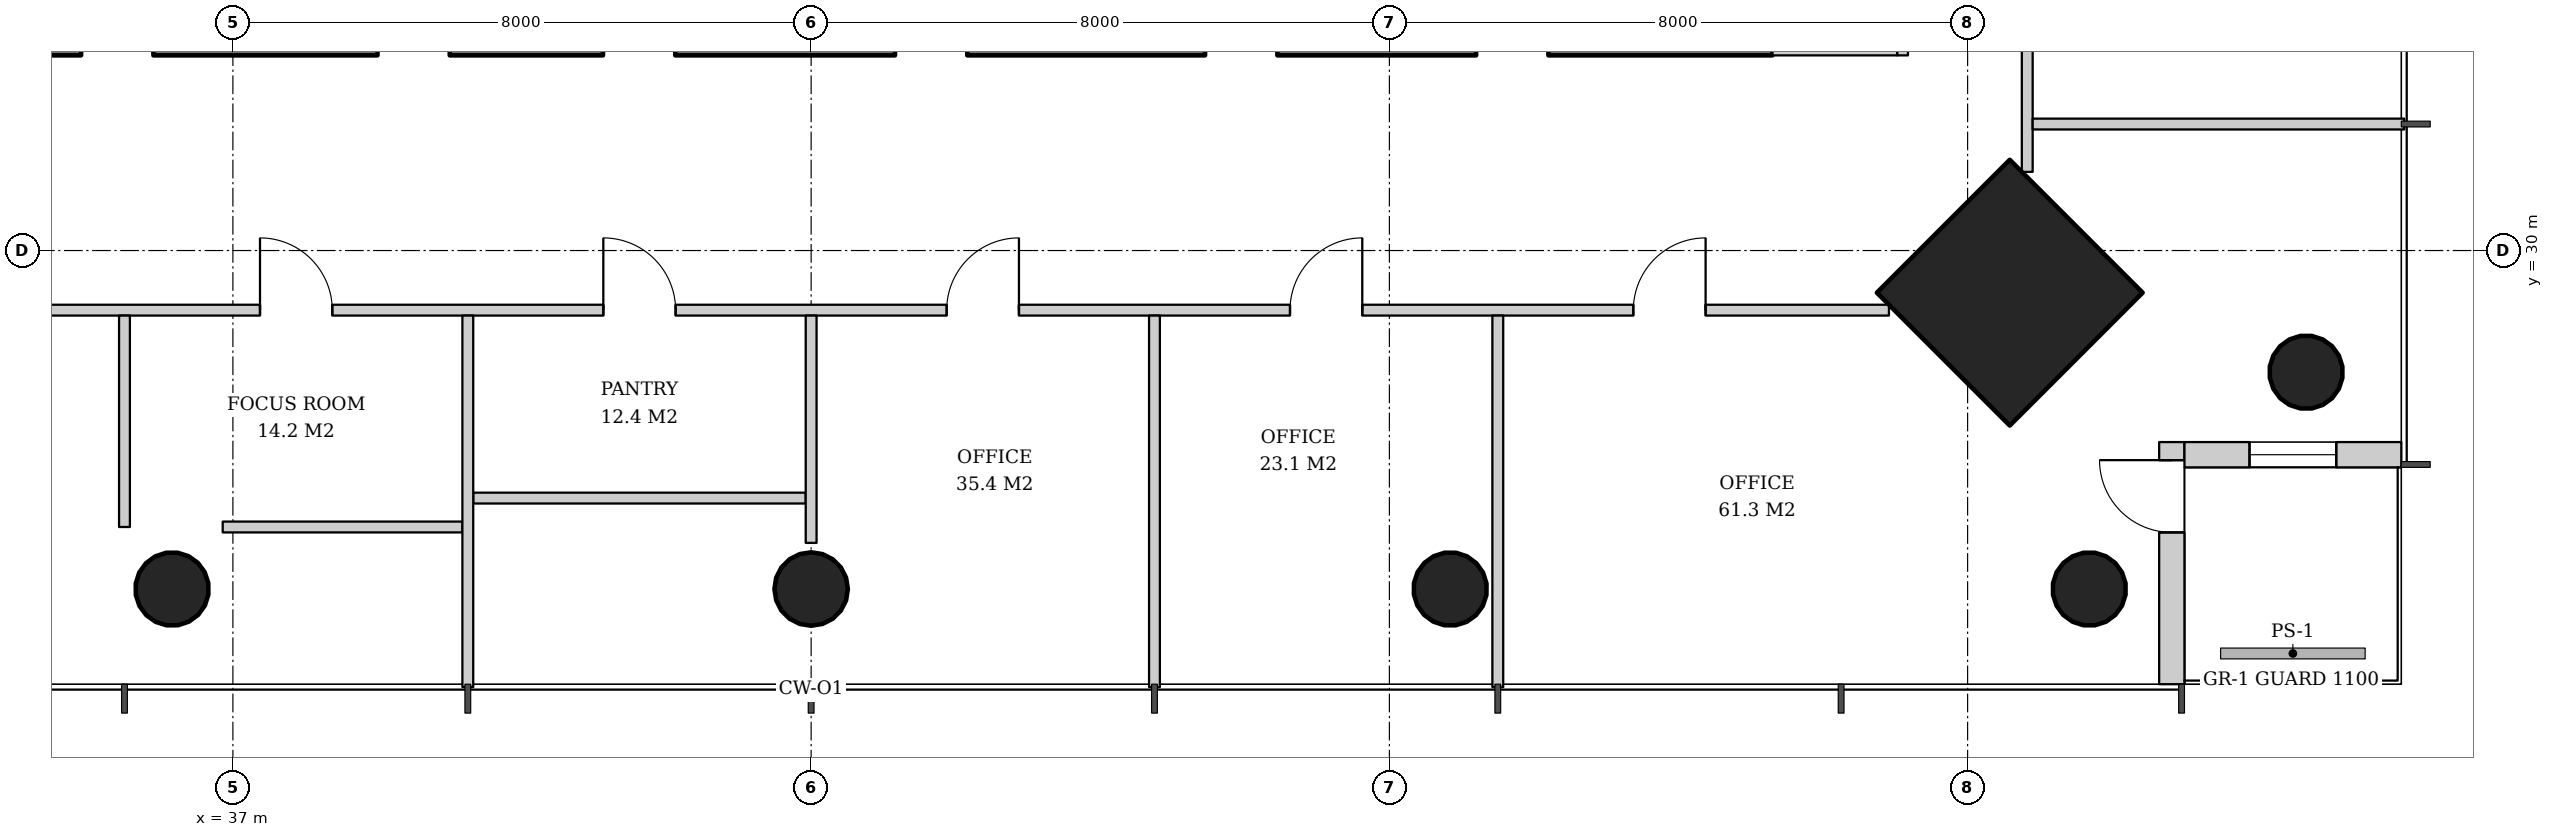
"""IFC4 building model, lengths in metres.
Left out: names, types, materials, properties, quantities, classifications, styles, units other than length and angle.
Written with IfcOpenShell. Run it as: python <this file> out.ifc"""

import sys

from ifc_helpers import new_model, si_unit, direction, frame, frame_2d, origin, origin_2d, place, context, subcontext, project, spatial, rectangle, hollow_circle, extrude, element, fill, save


model = new_model("IFC4")
c1 = context("Model", 3, precision=1e-05, world=origin(), true_north=direction((0.0, 1.0)))
c2 = subcontext(c1, "Body", "Model", "MODEL_VIEW")
j1 = project(units=[si_unit("LENGTHUNIT", "METRE"), si_unit("PLANEANGLEUNIT", "RADIAN")], contexts=[c1])
p1 = place(None, origin())
s1 = spatial("IfcSite", under=j1, at=p1, CompositionType="ELEMENT")
p2 = place(p1, origin())
s2 = spatial("IfcBuilding", under=s1, at=p2, CompositionType="ELEMENT")
p3 = place(p2, frame((0.0, 0.0, 123.6)))
s3 = spatial("IfcBuildingStorey", under=s2, at=p3, CompositionType="ELEMENT", Elevation=123.6)
p4 = place(p3, frame((65.721, 28.279, 0.0), z_axis=(-0.031900153262, 0.031900153262, 0.998981861919), x_axis=(-0.707106781187, -0.707106781187, 0.0)))
e1 = element("IfcColumn", 1, at=p4, inside=s3, PredefinedType="COLUMN", context=c2, shape_type="SweptSolid", body=[
    extrude(hollow_circle(Radius=0.508, WallThickness=0.04, at=origin_2d()), origin(), (0.0, 0.0, 1.0), 3.804),
])
p5 = place(p3, frame((61.621, 29.379, 0.0), z_axis=(-0.031900153262, 0.031900153262, 0.998981861919), x_axis=(-0.707106781187, -0.707106781187, 0.0)))
e2 = element("IfcColumn", 2, at=p5, inside=s3, PredefinedType="COLUMN", context=c2, shape_type="SweptSolid", body=[
    extrude(rectangle(XDim=2.6, YDim=2.6, at=origin_2d()), origin(), (0.0, 0.0, 1.0), 3.804),
])
p6 = place(p3, frame((62.721, 25.279, 0.0), z_axis=(-0.031900153262, 0.031900153262, 0.998981861919), x_axis=(-0.707106781187, -0.707106781187, 0.0)))
e3 = element("IfcColumn", 3, at=p6, inside=s3, PredefinedType="COLUMN", context=c2, shape_type="SweptSolid", body=[
    extrude(hollow_circle(Radius=0.508, WallThickness=0.04, at=origin_2d()), origin(), (0.0, 0.0, 1.0), 3.804),
])
p7 = place(p3, frame((36.139, 25.279, 0.0), z_axis=(0.015924069971, 0.031912349901, 0.999363810591), x_axis=(-0.894786976326, 0.446493300058, 0.0)))
e4 = element("IfcColumn", 4, at=p7, inside=s3, PredefinedType="COLUMN", context=c2, shape_type="SweptSolid", body=[
    extrude(hollow_circle(Radius=0.508, WallThickness=0.04, at=origin_2d()), origin(), (0.0, 0.0, 1.0), 3.802),
])
p8 = place(p3, frame((45.0, 25.279, 0.0), z_axis=(0.0, 0.031916396774, 0.999490542035), x_axis=(-1.0, 0.0, 0.0)))
e5 = element("IfcColumn", 5, at=p8, inside=s3, PredefinedType="COLUMN", context=c2, shape_type="SweptSolid", body=[
    extrude(hollow_circle(Radius=0.508, WallThickness=0.04, at=origin_2d()), origin(), (0.0, 0.0, 1.0), 3.802),
])
p9 = place(p3, frame((53.861, 25.279, 0.0), z_axis=(-0.015924069971, 0.031912349901, 0.999363810591), x_axis=(-0.894786976326, -0.446493300058, 0.0)))
e6 = element("IfcColumn", 6, at=p9, inside=s3, PredefinedType="COLUMN", context=c2, shape_type="SweptSolid", body=[
    extrude(hollow_circle(Radius=0.508, WallThickness=0.04, at=origin_2d()), origin(), (0.0, 0.0, 1.0), 3.802),
])
p10 = place(p3, frame((31.7, 33.05, 0.0), z_axis=(0.0, 0.0, 1.0), x_axis=(1.0, 0.0, 0.0)))
e7 = element("IfcWall", 7, at=p10, inside=s3, PredefinedType="SHEAR", context=c2, shape_type="SweptSolid", body=[
    extrude(rectangle(XDim=26.6, YDim=0.7, at=frame_2d((13.3, 0.0))), origin(), (0.0, 0.0, 1.0), 3.8),
])
p11 = place(p10, frame((7.3, 0.0, 0.0)))
e8 = element("IfcOpeningElement", 8, at=p11, cuts=e7, PredefinedType="OPENING", context=c2, shape_type="SweptSolid", body=[
    extrude(rectangle(XDim=1.0, YDim=2.1, at=frame_2d((0.5, 1.05))), frame((0.0, 0.36, 0.0), z_axis=(0.0, -1.0, 0.0), x_axis=(1.0, 0.0, 0.0)), (0.0, 0.0, 1.0), 0.72),
])
p12 = place(p10, frame((18.75, 0.0, 0.0)))
e9 = element("IfcOpeningElement", 9, at=p12, cuts=e7, PredefinedType="OPENING", context=c2, shape_type="SweptSolid", body=[
    extrude(rectangle(XDim=1.0, YDim=2.1, at=frame_2d((0.5, 1.05))), frame((0.0, 0.36, 0.0), z_axis=(0.0, -1.0, 0.0), x_axis=(1.0, 0.0, 0.0)), (0.0, 0.0, 1.0), 0.72),
])
p13 = place(p10, frame((3.2, 0.0, 0.0)))
e10 = element("IfcOpeningElement", 10, at=p13, cuts=e7, PredefinedType="OPENING", context=c2, shape_type="SweptSolid", body=[
    extrude(rectangle(XDim=1.0, YDim=2.1, at=frame_2d((0.5, 1.05))), frame((0.0, 0.36, 0.0), z_axis=(0.0, -1.0, 0.0), x_axis=(1.0, 0.0, 0.0)), (0.0, 0.0, 1.0), 0.72),
])
p14 = place(p10, frame((10.42, 0.0, 0.0)))
e11 = element("IfcOpeningElement", 11, at=p14, cuts=e7, PredefinedType="OPENING", context=c2, shape_type="SweptSolid", body=[
    extrude(rectangle(XDim=1.0, YDim=2.1, at=frame_2d((0.5, 1.05))), frame((0.0, 0.36, 0.0), z_axis=(0.0, -1.0, 0.0), x_axis=(1.0, 0.0, 0.0)), (0.0, 0.0, 1.0), 0.72),
])
p15 = place(p10, frame((14.46, 0.0, 0.0)))
e12 = element("IfcOpeningElement", 12, at=p15, cuts=e7, PredefinedType="OPENING", context=c2, shape_type="SweptSolid", body=[
    extrude(rectangle(XDim=1.0, YDim=2.1, at=frame_2d((0.5, 1.05))), frame((0.0, 0.36, 0.0), z_axis=(0.0, -1.0, 0.0), x_axis=(1.0, 0.0, 0.0)), (0.0, 0.0, 1.0), 0.72),
])
p16 = place(p10, frame((22.5, 0.0, 0.0)))
e13 = element("IfcOpeningElement", 13, at=p16, cuts=e7, PredefinedType="OPENING", context=c2, shape_type="SweptSolid", body=[
    extrude(rectangle(XDim=1.0, YDim=2.1, at=frame_2d((0.5, 1.05))), frame((0.0, 0.36, 0.0), z_axis=(0.0, -1.0, 0.0), x_axis=(1.0, 0.0, 0.0)), (0.0, 0.0, 1.0), 0.72),
])
p17 = place(p3, frame((63.825, 24.0, 0.0), z_axis=(0.0, 0.0, 1.0), x_axis=(0.0, 1.0, 0.0)))
e14 = element("IfcWall", 14, at=p17, inside=s3, PredefinedType="SOLIDWALL", context=c2, shape_type="SweptSolid", body=[
    extrude(rectangle(XDim=3.35, YDim=0.35, at=frame_2d((1.675, 0.0))), origin(), (0.0, 0.0, 1.0), 3.62),
])
p18 = place(p17, frame((2.1, 0.0, 0.0)))
e15 = element("IfcOpeningElement", 15, at=p18, cuts=e14, PredefinedType="OPENING", context=c2, shape_type="SweptSolid", body=[
    extrude(rectangle(XDim=1.0, YDim=2.4, at=frame_2d((0.5, 1.2))), frame((0.0, 0.185, 0.0), z_axis=(0.0, -1.0, 0.0), x_axis=(1.0, 0.0, 0.0)), (0.0, 0.0, 1.0), 0.37),
])
p19 = place(p3, frame((64.0, 27.175, 0.0), z_axis=(0.0, 0.0, 1.0), x_axis=(1.0, 0.0, 0.0)))
e16 = element("IfcWall", 16, at=p19, inside=s3, PredefinedType="SOLIDWALL", context=c2, shape_type="SweptSolid", body=[
    extrude(rectangle(XDim=3.0, YDim=0.35, at=frame_2d((1.5, 0.0))), origin(), (0.0, 0.0, 1.0), 3.62),
])
p20 = place(p19, frame((0.9, 0.0, 0.6)))
e17 = element("IfcOpeningElement", 17, at=p20, cuts=e16, PredefinedType="OPENING", context=c2, shape_type="SweptSolid", body=[
    extrude(rectangle(XDim=1.2, YDim=2.55, at=frame_2d((0.6, 1.275))), frame((0.0, 0.185, 0.0), z_axis=(0.0, -1.0, 0.0), x_axis=(1.0, 0.0, 0.0)), (0.0, 0.0, 1.0), 0.37),
])
p21 = place(p3, frame((60.1, 32.7, 0.0), z_axis=(0.0, 0.0, 1.0), x_axis=(0.0, 1.0, 0.0)))
e18 = element("IfcWall", 18, at=p21, inside=s3, PredefinedType="PARTITIONING", context=c2, shape_type="SweptSolid", body=[
    extrude(rectangle(XDim=11.275, YDim=0.15, at=frame_2d((5.638, 0.0))), origin(), (0.0, 0.0, 1.0), 2.72),
])
p22 = place(p21, frame((5.137, 0.0, 0.0)))
e19 = element("IfcOpeningElement", 19, at=p22, cuts=e18, PredefinedType="OPENING", context=c2, shape_type="SweptSolid", body=[
    extrude(rectangle(XDim=1.0, YDim=2.1, at=frame_2d((0.5, 1.05))), frame((0.0, 0.085, 0.0), z_axis=(0.0, -1.0, 0.0), x_axis=(1.0, 0.0, 0.0)), (0.0, 0.0, 1.0), 0.17),
])
p23 = place(p3, frame((58.3, 32.775, 0.0), z_axis=(0.0, 0.0, 1.0), x_axis=(1.0, 0.0, 0.0)))
e20 = element("IfcWall", 20, at=p23, inside=s3, PredefinedType="PARTITIONING", context=c2, shape_type="SweptSolid", body=[
    extrude(rectangle(XDim=1.725, YDim=0.15, at=frame_2d((0.862, 0.0))), origin(), (0.0, 0.0, 1.0), 3.62),
])
p24 = place(p3, frame((61.825, 31.088, 0.0), z_axis=(0.0, 0.0, 1.0), x_axis=(0.0, 1.0, 0.0)))
e21 = element("IfcWall", 21, at=p24, inside=s3, PredefinedType="PARTITIONING", context=c2, shape_type="SweptSolid", body=[
    extrude(rectangle(XDim=29.823, YDim=0.15, at=frame_2d((14.912, 0.0))), origin(), (0.0, 0.0, 1.0), 2.72),
])
p25 = place(p24, frame((2.537, 0.0, 0.0)))
e22 = element("IfcOpeningElement", 22, at=p25, cuts=e21, PredefinedType="OPENING", context=c2, shape_type="SweptSolid", body=[
    extrude(rectangle(XDim=1.0, YDim=2.1, at=frame_2d((0.5, 1.05))), frame((0.0, 0.085, 0.0), z_axis=(0.0, -1.0, 0.0), x_axis=(1.0, 0.0, 0.0)), (0.0, 0.0, 1.0), 0.17),
])
p26 = place(p24, frame((7.287, 0.0, 0.0)))
e23 = element("IfcOpeningElement", 23, at=p26, cuts=e21, PredefinedType="OPENING", context=c2, shape_type="SweptSolid", body=[
    extrude(rectangle(XDim=1.0, YDim=2.1, at=frame_2d((0.5, 1.05))), frame((0.0, 0.085, 0.0), z_axis=(0.0, -1.0, 0.0), x_axis=(1.0, 0.0, 0.0)), (0.0, 0.0, 1.0), 0.17),
])
p27 = place(p24, frame((12.037, 0.0, 0.0)))
e24 = element("IfcOpeningElement", 24, at=p27, cuts=e21, PredefinedType="OPENING", context=c2, shape_type="SweptSolid", body=[
    extrude(rectangle(XDim=1.0, YDim=2.1, at=frame_2d((0.5, 1.05))), frame((0.0, 0.085, 0.0), z_axis=(0.0, -1.0, 0.0), x_axis=(1.0, 0.0, 0.0)), (0.0, 0.0, 1.0), 0.17),
])
p28 = place(p24, frame((16.787, 0.0, 0.0)))
e25 = element("IfcOpeningElement", 25, at=p28, cuts=e21, PredefinedType="OPENING", context=c2, shape_type="SweptSolid", body=[
    extrude(rectangle(XDim=1.0, YDim=2.1, at=frame_2d((0.5, 1.05))), frame((0.0, 0.085, 0.0), z_axis=(0.0, -1.0, 0.0), x_axis=(1.0, 0.0, 0.0)), (0.0, 0.0, 1.0), 0.17),
])
p29 = place(p24, frame((21.537, 0.0, 0.0)))
e26 = element("IfcOpeningElement", 26, at=p29, cuts=e21, PredefinedType="OPENING", context=c2, shape_type="SweptSolid", body=[
    extrude(rectangle(XDim=1.0, YDim=2.1, at=frame_2d((0.5, 1.05))), frame((0.0, 0.085, 0.0), z_axis=(0.0, -1.0, 0.0), x_axis=(1.0, 0.0, 0.0)), (0.0, 0.0, 1.0), 0.17),
])
p30 = place(p3, frame((61.9, 31.75, 0.0), z_axis=(0.0, 0.0, 1.0), x_axis=(1.0, 0.0, 0.0)))
e27 = element("IfcWall", 27, at=p30, inside=s3, PredefinedType="PARTITIONING", context=c2, shape_type="SweptSolid", body=[
    extrude(rectangle(XDim=5.14, YDim=0.15, at=frame_2d((2.57, 0.0))), origin(), (0.0, 0.0, 1.0), 2.82),
])
p31 = place(p3, frame((36.859, 26.175, 0.0), z_axis=(0.0, 0.0, 1.0), x_axis=(1.0, 0.0, 0.0)))
e28 = element("IfcWall", 28, at=p31, inside=s3, PredefinedType="PARTITIONING", context=c2, shape_type="SweptSolid", body=[
    extrude(rectangle(XDim=3.316, YDim=0.15, at=frame_2d((1.658, 0.0))), origin(), (0.0, 0.0, 1.0), 3.62),
])
p32 = place(p3, frame((40.325, 26.575, 0.0), z_axis=(0.0, 0.0, 1.0), x_axis=(1.0, 0.0, 0.0)))
e29 = element("IfcWall", 29, at=p32, inside=s3, PredefinedType="PARTITIONING", context=c2, shape_type="SweptSolid", body=[
    extrude(rectangle(XDim=4.6, YDim=0.15, at=frame_2d((2.3, 0.0))), origin(), (0.0, 0.0, 1.0), 2.858),
])
p33 = place(p3, frame((30.088, 29.175, 0.0), z_axis=(0.0, 0.0, 1.0), x_axis=(1.0, 0.0, 0.0)))
e30 = element("IfcWall", 30, at=p33, inside=s3, PredefinedType="PARTITIONING", context=c2, shape_type="SweptSolid", body=[
    extrude(rectangle(XDim=29.823, YDim=0.15, at=frame_2d((14.912, 0.0))), origin(), (0.0, 0.0, 1.0), 2.72),
])
p34 = place(p33, frame((2.537, 0.0, 0.0)))
e31 = element("IfcOpeningElement", 31, at=p34, cuts=e30, PredefinedType="OPENING", context=c2, shape_type="SweptSolid", body=[
    extrude(rectangle(XDim=1.0, YDim=2.1, at=frame_2d((0.5, 1.05))), frame((0.0, 0.085, 0.0), z_axis=(0.0, -1.0, 0.0), x_axis=(1.0, 0.0, 0.0)), (0.0, 0.0, 1.0), 0.17),
])
p35 = place(p33, frame((7.287, 0.0, 0.0)))
e32 = element("IfcOpeningElement", 32, at=p35, cuts=e30, PredefinedType="OPENING", context=c2, shape_type="SweptSolid", body=[
    extrude(rectangle(XDim=1.0, YDim=2.1, at=frame_2d((0.5, 1.05))), frame((0.0, 0.085, 0.0), z_axis=(0.0, -1.0, 0.0), x_axis=(1.0, 0.0, 0.0)), (0.0, 0.0, 1.0), 0.17),
])
p36 = place(p33, frame((12.037, 0.0, 0.0)))
e33 = element("IfcOpeningElement", 33, at=p36, cuts=e30, PredefinedType="OPENING", context=c2, shape_type="SweptSolid", body=[
    extrude(rectangle(XDim=1.0, YDim=2.1, at=frame_2d((0.5, 1.05))), frame((0.0, 0.085, 0.0), z_axis=(0.0, -1.0, 0.0), x_axis=(1.0, 0.0, 0.0)), (0.0, 0.0, 1.0), 0.17),
])
p37 = place(p33, frame((16.787, 0.0, 0.0)))
e34 = element("IfcOpeningElement", 34, at=p37, cuts=e30, PredefinedType="OPENING", context=c2, shape_type="SweptSolid", body=[
    extrude(rectangle(XDim=1.0, YDim=2.1, at=frame_2d((0.5, 1.05))), frame((0.0, 0.085, 0.0), z_axis=(0.0, -1.0, 0.0), x_axis=(1.0, 0.0, 0.0)), (0.0, 0.0, 1.0), 0.17),
])
p38 = place(p33, frame((21.537, 0.0, 0.0)))
e35 = element("IfcOpeningElement", 35, at=p38, cuts=e30, PredefinedType="OPENING", context=c2, shape_type="SweptSolid", body=[
    extrude(rectangle(XDim=1.0, YDim=2.1, at=frame_2d((0.5, 1.05))), frame((0.0, 0.085, 0.0), z_axis=(0.0, -1.0, 0.0), x_axis=(1.0, 0.0, 0.0)), (0.0, 0.0, 1.0), 0.17),
])
p39 = place(p33, frame((26.287, 0.0, 0.0)))
e36 = element("IfcOpeningElement", 36, at=p39, cuts=e30, PredefinedType="OPENING", context=c2, shape_type="SweptSolid", body=[
    extrude(rectangle(XDim=1.0, YDim=2.1, at=frame_2d((0.5, 1.05))), frame((0.0, 0.085, 0.0), z_axis=(0.0, -1.0, 0.0), x_axis=(1.0, 0.0, 0.0)), (0.0, 0.0, 1.0), 0.17),
])
p40 = place(p3, frame((35.5, 29.1, 0.0), z_axis=(0.0, 0.0, 1.0), x_axis=(0.0, -1.0, 0.0)))
e37 = element("IfcWall", 37, at=p40, inside=s3, PredefinedType="PARTITIONING", context=c2, shape_type="SweptSolid", body=[
    extrude(rectangle(XDim=2.925, YDim=0.15, at=frame_2d((1.462, 0.0))), origin(), (0.0, 0.0, 1.0), 3.62),
])
p41 = place(p3, frame((40.25, 29.1, 0.0), z_axis=(0.0, 0.0, 1.0), x_axis=(0.0, -1.0, 0.0)))
e38 = element("IfcWall", 38, at=p41, inside=s3, PredefinedType="PARTITIONING", context=c2, shape_type="SweptSolid", body=[
    extrude(rectangle(XDim=5.14, YDim=0.15, at=frame_2d((2.57, 0.0))), origin(), (0.0, 0.0, 1.0), 2.82),
])
p42 = place(p3, frame((45.0, 29.1, 0.0), z_axis=(0.0, 0.0, 1.0), x_axis=(0.0, -1.0, 0.0)))
e39 = element("IfcWall", 39, at=p42, inside=s3, PredefinedType="PARTITIONING", context=c2, shape_type="SweptSolid", body=[
    extrude(rectangle(XDim=3.145, YDim=0.15, at=frame_2d((1.573, 0.0))), origin(), (0.0, 0.0, 1.0), 3.62),
])
for number, where, z_axis, x_axis in (
    (40, (49.75, 29.1, 0.0), (0.0, 0.0, 1.0), (0.0, -1.0, 0.0)),
    (41, (54.5, 29.1, 0.0), (0.0, 0.0, 1.0), (0.0, -1.0, 0.0)),
):
    element("IfcWall", number, at=place(p3, frame(where, z_axis=z_axis, x_axis=x_axis)), inside=s3, PredefinedType="PARTITIONING", context=c2, shape_type="SweptSolid", body=[
        extrude(rectangle(XDim=5.14, YDim=0.15, at=frame_2d((2.57, 0.0))), origin(), (0.0, 0.0, 1.0), 2.82),
    ])
p43 = place(p18, origin())
e42 = element("IfcDoor", 42, at=p43, inside=s3, OperationType="SINGLE_SWING_RIGHT", PredefinedType="DOOR", context=c2, shape_type="SweptSolid", body=[
    extrude(rectangle(XDim=1.0, YDim=2.4, at=frame_2d((0.5, 1.2))), frame((0.0, 0.025, 0.0), z_axis=(0.0, -1.0, 0.0), x_axis=(1.0, 0.0, 0.0)), (0.0, 0.0, 1.0), 0.05),
])
fill(e15, e42)
p44 = place(p20, origin())
e43 = element("IfcWindow", 43, at=p44, inside=s3, PartitioningType="SINGLE_PANEL", PredefinedType="WINDOW", context=c2, shape_type="SweptSolid", body=[
    extrude(rectangle(XDim=1.2, YDim=2.55, at=frame_2d((0.6, 1.275))), frame((0.0, 0.03, 0.0), z_axis=(0.0, -1.0, 0.0), x_axis=(1.0, 0.0, 0.0)), (0.0, 0.0, 1.0), 0.06),
])
fill(e17, e43)
p45 = place(p35, origin())
e44 = element("IfcDoor", 44, at=p45, inside=s3, OperationType="SINGLE_SWING_LEFT", PredefinedType="DOOR", context=c2, shape_type="SweptSolid", body=[
    extrude(rectangle(XDim=1.0, YDim=2.1, at=frame_2d((0.5, 1.05))), frame((0.0, 0.025, 0.0), z_axis=(0.0, -1.0, 0.0), x_axis=(1.0, 0.0, 0.0)), (0.0, 0.0, 1.0), 0.05),
])
fill(e32, e44)
p46 = place(p36, origin())
e45 = element("IfcDoor", 45, at=p46, inside=s3, OperationType="SINGLE_SWING_LEFT", PredefinedType="DOOR", context=c2, shape_type="SweptSolid", body=[
    extrude(rectangle(XDim=1.0, YDim=2.1, at=frame_2d((0.5, 1.05))), frame((0.0, 0.025, 0.0), z_axis=(0.0, -1.0, 0.0), x_axis=(1.0, 0.0, 0.0)), (0.0, 0.0, 1.0), 0.05),
])
fill(e33, e45)
p47 = place(p37, origin())
e46 = element("IfcDoor", 46, at=p47, inside=s3, OperationType="SINGLE_SWING_RIGHT", PredefinedType="DOOR", context=c2, shape_type="SweptSolid", body=[
    extrude(rectangle(XDim=1.0, YDim=2.1, at=frame_2d((0.5, 1.05))), frame((0.0, 0.025, 0.0), z_axis=(0.0, -1.0, 0.0), x_axis=(1.0, 0.0, 0.0)), (0.0, 0.0, 1.0), 0.05),
])
fill(e34, e46)
p48 = place(p38, origin())
e47 = element("IfcDoor", 47, at=p48, inside=s3, OperationType="SINGLE_SWING_RIGHT", PredefinedType="DOOR", context=c2, shape_type="SweptSolid", body=[
    extrude(rectangle(XDim=1.0, YDim=2.1, at=frame_2d((0.5, 1.05))), frame((0.0, 0.025, 0.0), z_axis=(0.0, -1.0, 0.0), x_axis=(1.0, 0.0, 0.0)), (0.0, 0.0, 1.0), 0.05),
])
fill(e35, e47)
p49 = place(p39, origin())
e48 = element("IfcDoor", 48, at=p49, inside=s3, OperationType="SINGLE_SWING_RIGHT", PredefinedType="DOOR", context=c2, shape_type="SweptSolid", body=[
    extrude(rectangle(XDim=1.0, YDim=2.1, at=frame_2d((0.5, 1.05))), frame((0.0, 0.025, 0.0), z_axis=(0.0, -1.0, 0.0), x_axis=(1.0, 0.0, 0.0)), (0.0, 0.0, 1.0), 0.05),
])
fill(e36, e48)
save(model, sys.argv[1])
